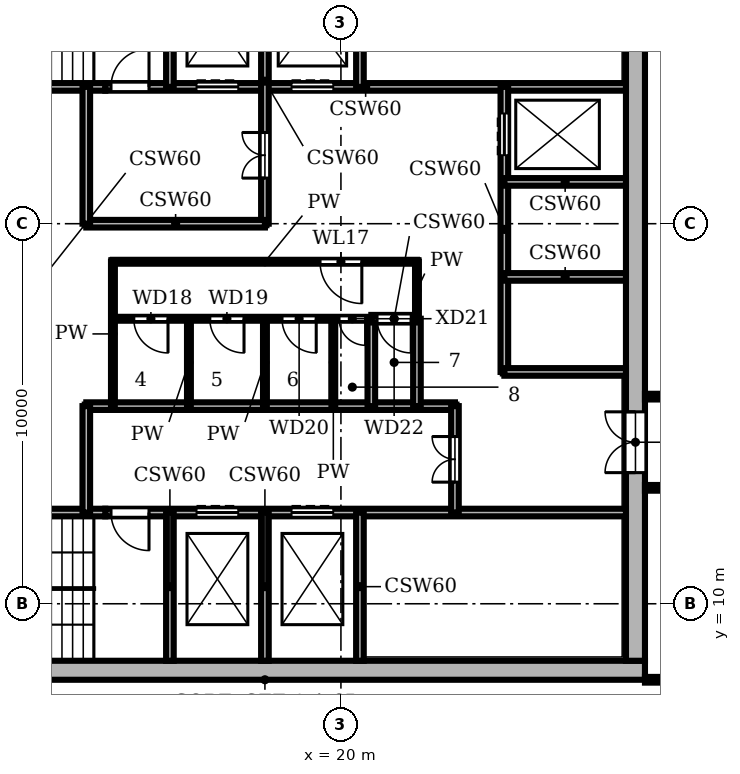
"""IFC4 building model, lengths in metres.
Left out: names, types, materials, properties, quantities, classifications, styles, units other than length and angle.
Written with IfcOpenShell. Run it as: python <this file> out.ifc"""

import sys

from ifc_helpers import new_model, si_unit, direction, frame, frame_2d, origin, place, context, subcontext, project, spatial, rectangle, extrude, element, fill, save


model = new_model("IFC4")
c1 = context("Model", 3, precision=1e-05, world=origin(), true_north=direction((0.0, 1.0)))
c2 = subcontext(c1, "Body", "Model", "MODEL_VIEW")
j1 = project(units=[si_unit("LENGTHUNIT", "METRE"), si_unit("PLANEANGLEUNIT", "RADIAN")], contexts=[c1])
p1 = place(None, origin())
s1 = spatial("IfcSite", under=j1, at=p1, CompositionType="ELEMENT")
p2 = place(p1, origin())
s2 = spatial("IfcBuilding", under=s1, at=p2, CompositionType="ELEMENT")
p3 = place(p2, frame((0.0, 0.0, 278.7)))
s3 = spatial("IfcBuildingStorey", under=s2, at=p3, CompositionType="ELEMENT", Elevation=278.7)
p4 = place(p3, frame((8.0, 8.25, 0.0), z_axis=(0.0, 0.0, 1.0), x_axis=(1.0, 0.0, 0.0)))
e1 = element("IfcWall", 1, at=p4, inside=s3, PredefinedType="SHEAR", context=c2, shape_type="SweptSolid", body=[
    extrude(rectangle(XDim=20.0, YDim=0.5, at=frame_2d((10.0, 0.0))), origin(), (0.0, 0.0, 1.0), 3.9),
])
p5 = place(p3, frame((27.75, 8.5, 0.0), z_axis=(0.0, 0.0, 1.0), x_axis=(0.0, 1.0, 0.0)))
e2 = element("IfcWall", 2, at=p5, inside=s3, PredefinedType="SHEAR", context=c2, shape_type="SweptSolid", body=[
    extrude(rectangle(XDim=19.0, YDim=0.5, at=frame_2d((9.5, 0.0))), origin(), (0.0, 0.0, 1.0), 3.9),
])
p6 = place(p5, frame((4.95, 0.0, 0.0)))
e3 = element("IfcOpeningElement", 3, at=p6, cuts=e2, PredefinedType="OPENING", context=c2, shape_type="SweptSolid", body=[
    extrude(rectangle(XDim=1.6, YDim=2.1, at=frame_2d((0.8, 1.05))), frame((0.0, 0.26, 0.0), z_axis=(0.0, -1.0, 0.0), x_axis=(1.0, 0.0, 0.0)), (0.0, 0.0, 1.0), 0.52),
])
p7 = place(p3, frame((8.5, 12.4, 0.0), z_axis=(0.0, 0.0, 1.0), x_axis=(1.0, 0.0, 0.0)))
e4 = element("IfcWall", 4, at=p7, inside=s3, PredefinedType="SHEAR", context=c2, shape_type="SweptSolid", body=[
    extrude(rectangle(XDim=5.3, YDim=0.2, at=frame_2d((2.65, 0.0))), origin(), (0.0, 0.0, 1.0), 3.58),
])
p8 = place(p3, frame((13.8, 12.4, 0.0), z_axis=(0.0, 0.0, 1.0), x_axis=(1.0, 0.0, 0.0)))
e5 = element("IfcWall", 5, at=p8, inside=s3, PredefinedType="SHEAR", context=c2, shape_type="SweptSolid", body=[
    extrude(rectangle(XDim=13.7, YDim=0.2, at=frame_2d((6.85, 0.0))), origin(), (0.0, 0.0, 1.0), 3.58),
])
p9 = place(p8, frame((2.4, 0.0, 0.0)))
e6 = element("IfcOpeningElement", 6, at=p9, cuts=e5, PredefinedType="OPENING", context=c2, shape_type="SweptSolid", body=[
    extrude(rectangle(XDim=1.1, YDim=2.1, at=frame_2d((0.55, 1.05))), frame((0.0, 0.11, 0.0), z_axis=(0.0, -1.0, 0.0), x_axis=(1.0, 0.0, 0.0)), (0.0, 0.0, 1.0), 0.22),
])
p10 = place(p8, frame((4.9, 0.0, 0.0)))
e7 = element("IfcOpeningElement", 7, at=p10, cuts=e5, PredefinedType="OPENING", context=c2, shape_type="SweptSolid", body=[
    extrude(rectangle(XDim=1.1, YDim=2.1, at=frame_2d((0.55, 1.05))), frame((0.0, 0.11, 0.0), z_axis=(0.0, -1.0, 0.0), x_axis=(1.0, 0.0, 0.0)), (0.0, 0.0, 1.0), 0.22),
])
p11 = place(p8, frame((0.15, 0.0, 0.0)))
e8 = element("IfcOpeningElement", 8, at=p11, cuts=e5, PredefinedType="OPENING", context=c2, shape_type="SweptSolid", body=[
    extrude(rectangle(XDim=1.0, YDim=2.1, at=frame_2d((0.5, 1.05))), frame((0.0, 0.11, 0.0), z_axis=(0.0, -1.0, 0.0), x_axis=(1.0, 0.0, 0.0)), (0.0, 0.0, 1.0), 0.22),
])
p12 = place(p3, frame((13.3, 15.2, 0.0), z_axis=(0.0, 0.0, 1.0), x_axis=(1.0, 0.0, 0.0)))
e9 = element("IfcWall", 9, at=p12, inside=s3, PredefinedType="SHEAR", context=c2, shape_type="SweptSolid", body=[
    extrude(rectangle(XDim=9.7, YDim=0.2, at=frame_2d((4.85, 0.0))), origin(), (0.0, 0.0, 1.0), 3.58),
])
p13 = place(p3, frame((24.3, 16.1, 0.0), z_axis=(0.0, 0.0, 1.0), x_axis=(1.0, 0.0, 0.0)))
e10 = element("IfcWall", 10, at=p13, inside=s3, PredefinedType="SHEAR", context=c2, shape_type="SweptSolid", body=[
    extrude(rectangle(XDim=3.2, YDim=0.2, at=frame_2d((1.6, 0.0))), origin(), (0.0, 0.0, 1.0), 3.58),
])
p14 = place(p3, frame((14.0, 17.5, 0.0), z_axis=(0.0, 0.0, 1.0), x_axis=(1.0, 0.0, 0.0)))
e11 = element("IfcWall", 11, at=p14, inside=s3, PredefinedType="PARTITIONING", context=c2, shape_type="SweptSolid", body=[
    extrude(rectangle(XDim=6.8, YDim=0.1, at=frame_2d((3.4, 0.0))), origin(), (0.0, 0.0, 1.0), 3.58),
])
p15 = place(p14, frame((0.55, 0.0, 0.0)))
e12 = element("IfcOpeningElement", 12, at=p15, cuts=e11, PredefinedType="OPENING", context=c2, shape_type="SweptSolid", body=[
    extrude(rectangle(XDim=0.9, YDim=2.1, at=frame_2d((0.45, 1.05))), frame((0.0, 0.06, 0.0), z_axis=(0.0, -1.0, 0.0), x_axis=(1.0, 0.0, 0.0)), (0.0, 0.0, 1.0), 0.12),
])
p16 = place(p14, frame((2.55, 0.0, 0.0)))
e13 = element("IfcOpeningElement", 13, at=p16, cuts=e11, PredefinedType="OPENING", context=c2, shape_type="SweptSolid", body=[
    extrude(rectangle(XDim=0.9, YDim=2.1, at=frame_2d((0.45, 1.05))), frame((0.0, 0.06, 0.0), z_axis=(0.0, -1.0, 0.0), x_axis=(1.0, 0.0, 0.0)), (0.0, 0.0, 1.0), 0.12),
])
p17 = place(p14, frame((4.45, 0.0, 0.0)))
e14 = element("IfcOpeningElement", 14, at=p17, cuts=e11, PredefinedType="OPENING", context=c2, shape_type="SweptSolid", body=[
    extrude(rectangle(XDim=0.9, YDim=2.1, at=frame_2d((0.45, 1.05))), frame((0.0, 0.06, 0.0), z_axis=(0.0, -1.0, 0.0), x_axis=(1.0, 0.0, 0.0)), (0.0, 0.0, 1.0), 0.12),
])
p18 = place(p14, frame((5.95, 0.0, 0.0)))
e15 = element("IfcOpeningElement", 15, at=p18, cuts=e11, PredefinedType="OPENING", context=c2, shape_type="SweptSolid", body=[
    extrude(rectangle(XDim=0.7, YDim=2.1, at=frame_2d((0.35, 1.05))), frame((0.0, 0.06, 0.0), z_axis=(0.0, -1.0, 0.0), x_axis=(1.0, 0.0, 0.0)), (0.0, 0.0, 1.0), 0.12),
])
p19 = place(p3, frame((20.8, 17.5, 0.0), z_axis=(0.0, 0.0, 1.0), x_axis=(1.0, 0.0, 0.0)))
e16 = element("IfcWall", 16, at=p19, inside=s3, PredefinedType="SHEAR", context=c2, shape_type="SweptSolid", body=[
    extrude(rectangle(XDim=1.2, YDim=0.2, at=frame_2d((0.6, 0.0))), origin(), (0.0, 0.0, 1.0), 3.58),
])
p20 = place(p19, frame((0.15, 0.0, 0.0)))
e17 = element("IfcOpeningElement", 17, at=p20, cuts=e16, PredefinedType="OPENING", context=c2, shape_type="SweptSolid", body=[
    extrude(rectangle(XDim=0.9, YDim=2.1, at=frame_2d((0.45, 1.05))), frame((0.0, 0.11, 0.0), z_axis=(0.0, -1.0, 0.0), x_axis=(1.0, 0.0, 0.0)), (0.0, 0.0, 1.0), 0.22),
])
p21 = place(p3, frame((24.3, 18.6, 0.0), z_axis=(0.0, 0.0, 1.0), x_axis=(1.0, 0.0, 0.0)))
e18 = element("IfcWall", 18, at=p21, inside=s3, PredefinedType="SHEAR", context=c2, shape_type="SweptSolid", body=[
    extrude(rectangle(XDim=3.2, YDim=0.2, at=frame_2d((1.6, 0.0))), origin(), (0.0, 0.0, 1.0), 3.58),
])
p22 = place(p3, frame((14.0, 19.0, 0.0), z_axis=(0.0, 0.0, 1.0), x_axis=(1.0, 0.0, 0.0)))
e19 = element("IfcWall", 19, at=p22, inside=s3, PredefinedType="PARTITIONING", context=c2, shape_type="SweptSolid", body=[
    extrude(rectangle(XDim=8.0, YDim=0.1, at=frame_2d((4.0, 0.0))), origin(), (0.0, 0.0, 1.0), 3.58),
])
p23 = place(p22, frame((5.45, 0.0, 0.0)))
e20 = element("IfcOpeningElement", 20, at=p23, cuts=e19, PredefinedType="OPENING", context=c2, shape_type="SweptSolid", body=[
    extrude(rectangle(XDim=1.1, YDim=2.1, at=frame_2d((0.55, 1.05))), frame((0.0, 0.06, 0.0), z_axis=(0.0, -1.0, 0.0), x_axis=(1.0, 0.0, 0.0)), (0.0, 0.0, 1.0), 0.12),
])
p24 = place(p3, frame((13.3, 20.0, 0.0), z_axis=(0.0, 0.0, 1.0), x_axis=(1.0, 0.0, 0.0)))
e21 = element("IfcWall", 21, at=p24, inside=s3, PredefinedType="SHEAR", context=c2, shape_type="SweptSolid", body=[
    extrude(rectangle(XDim=4.7, YDim=0.2, at=frame_2d((2.35, 0.0))), origin(), (0.0, 0.0, 1.0), 3.58),
])
p25 = place(p3, frame((24.3, 21.1, 0.0), z_axis=(0.0, 0.0, 1.0), x_axis=(1.0, 0.0, 0.0)))
e22 = element("IfcWall", 22, at=p25, inside=s3, PredefinedType="SHEAR", context=c2, shape_type="SweptSolid", body=[
    extrude(rectangle(XDim=3.2, YDim=0.2, at=frame_2d((1.6, 0.0))), origin(), (0.0, 0.0, 1.0), 3.58),
])
p26 = place(p3, frame((8.5, 23.6, 0.0), z_axis=(0.0, 0.0, 1.0), x_axis=(1.0, 0.0, 0.0)))
e23 = element("IfcWall", 23, at=p26, inside=s3, PredefinedType="SHEAR", context=c2, shape_type="SweptSolid", body=[
    extrude(rectangle(XDim=5.3, YDim=0.2, at=frame_2d((2.65, 0.0))), origin(), (0.0, 0.0, 1.0), 3.58),
])
p27 = place(p3, frame((13.8, 23.6, 0.0), z_axis=(0.0, 0.0, 1.0), x_axis=(1.0, 0.0, 0.0)))
e24 = element("IfcWall", 24, at=p27, inside=s3, PredefinedType="SHEAR", context=c2, shape_type="SweptSolid", body=[
    extrude(rectangle(XDim=13.7, YDim=0.2, at=frame_2d((6.85, 0.0))), origin(), (0.0, 0.0, 1.0), 3.58),
])
p28 = place(p27, frame((2.4, 0.0, 0.0)))
e25 = element("IfcOpeningElement", 25, at=p28, cuts=e24, PredefinedType="OPENING", context=c2, shape_type="SweptSolid", body=[
    extrude(rectangle(XDim=1.1, YDim=2.1, at=frame_2d((0.55, 1.05))), frame((0.0, 0.11, 0.0), z_axis=(0.0, -1.0, 0.0), x_axis=(1.0, 0.0, 0.0)), (0.0, 0.0, 1.0), 0.22),
])
p29 = place(p27, frame((4.9, 0.0, 0.0)))
e26 = element("IfcOpeningElement", 26, at=p29, cuts=e24, PredefinedType="OPENING", context=c2, shape_type="SweptSolid", body=[
    extrude(rectangle(XDim=1.1, YDim=2.1, at=frame_2d((0.55, 1.05))), frame((0.0, 0.11, 0.0), z_axis=(0.0, -1.0, 0.0), x_axis=(1.0, 0.0, 0.0)), (0.0, 0.0, 1.0), 0.22),
])
p30 = place(p27, frame((0.15, 0.0, 0.0)))
e27 = element("IfcOpeningElement", 27, at=p30, cuts=e24, PredefinedType="OPENING", context=c2, shape_type="SweptSolid", body=[
    extrude(rectangle(XDim=1.0, YDim=2.1, at=frame_2d((0.5, 1.05))), frame((0.0, 0.11, 0.0), z_axis=(0.0, -1.0, 0.0), x_axis=(1.0, 0.0, 0.0)), (0.0, 0.0, 1.0), 0.22),
])
p31 = place(p3, frame((13.3, 12.4, 0.0), z_axis=(0.0, 0.0, 1.0), x_axis=(0.0, 1.0, 0.0)))
e28 = element("IfcWall", 28, at=p31, inside=s3, PredefinedType="SHEAR", context=c2, shape_type="SweptSolid", body=[
    extrude(rectangle(XDim=2.8, YDim=0.2, at=frame_2d((1.4, 0.0))), origin(), (0.0, 0.0, 1.0), 3.58),
])
p32 = place(p3, frame((13.3, 20.0, 0.0), z_axis=(0.0, 0.0, 1.0), x_axis=(0.0, 1.0, 0.0)))
e29 = element("IfcWall", 29, at=p32, inside=s3, PredefinedType="SHEAR", context=c2, shape_type="SweptSolid", body=[
    extrude(rectangle(XDim=3.6, YDim=0.2, at=frame_2d((1.8, 0.0))), origin(), (0.0, 0.0, 1.0), 3.58),
])
p33 = place(p3, frame((14.0, 15.2, 0.0), z_axis=(0.0, 0.0, 1.0), x_axis=(0.0, 1.0, 0.0)))
e30 = element("IfcWall", 30, at=p33, inside=s3, PredefinedType="PARTITIONING", context=c2, shape_type="SweptSolid", body=[
    extrude(rectangle(XDim=3.8, YDim=0.1, at=frame_2d((1.9, 0.0))), origin(), (0.0, 0.0, 1.0), 3.58),
])
for number, where, z_axis, x_axis in (
    (31, (15.5, 8.5, 0.0), (0.0, 0.0, 1.0), (0.0, 1.0, 0.0)),
    (32, (15.5, 23.6, 0.0), (0.0, 0.0, 1.0), (0.0, 1.0, 0.0)),
):
    element("IfcWall", number, at=place(p3, frame(where, z_axis=z_axis, x_axis=x_axis)), inside=s3, PredefinedType="SHEAR", context=c2, shape_type="SweptSolid", body=[
        extrude(rectangle(XDim=3.9, YDim=0.2, at=frame_2d((1.95, 0.0))), origin(), (0.0, 0.0, 1.0), 3.58),
    ])
for number, where, z_axis, x_axis in (
    (33, (16.0, 15.2, 0.0), (0.0, 0.0, 1.0), (0.0, 1.0, 0.0)),
    (34, (18.0, 15.2, 0.0), (0.0, 0.0, 1.0), (0.0, 1.0, 0.0)),
):
    element("IfcWall", number, at=place(p3, frame(where, z_axis=z_axis, x_axis=x_axis)), inside=s3, PredefinedType="PARTITIONING", context=c2, shape_type="SweptSolid", body=[
        extrude(rectangle(XDim=2.3, YDim=0.1, at=frame_2d((1.15, 0.0))), origin(), (0.0, 0.0, 1.0), 3.58),
    ])
p34 = place(p3, frame((18.0, 8.5, 0.0), z_axis=(0.0, 0.0, 1.0), x_axis=(0.0, 1.0, 0.0)))
e35 = element("IfcWall", 35, at=p34, inside=s3, PredefinedType="SHEAR", context=c2, shape_type="SweptSolid", body=[
    extrude(rectangle(XDim=3.9, YDim=0.2, at=frame_2d((1.95, 0.0))), origin(), (0.0, 0.0, 1.0), 3.58),
])
p35 = place(p3, frame((18.0, 20.0, 0.0), z_axis=(0.0, 0.0, 1.0), x_axis=(0.0, 1.0, 0.0)))
e36 = element("IfcWall", 36, at=p35, inside=s3, PredefinedType="SHEAR", context=c2, shape_type="SweptSolid", body=[
    extrude(rectangle(XDim=7.5, YDim=0.2, at=frame_2d((3.75, 0.0))), origin(), (0.0, 0.0, 1.0), 3.58),
])
p36 = place(p35, frame((1.2, 0.0, 0.0)))
e37 = element("IfcOpeningElement", 37, at=p36, cuts=e36, PredefinedType="OPENING", context=c2, shape_type="SweptSolid", body=[
    extrude(rectangle(XDim=1.2, YDim=2.1, at=frame_2d((0.6, 1.05))), frame((0.0, 0.11, 0.0), z_axis=(0.0, -1.0, 0.0), x_axis=(1.0, 0.0, 0.0)), (0.0, 0.0, 1.0), 0.22),
])
p37 = place(p3, frame((19.8, 15.2, 0.0), z_axis=(0.0, 0.0, 1.0), x_axis=(0.0, 1.0, 0.0)))
e38 = element("IfcWall", 38, at=p37, inside=s3, PredefinedType="PARTITIONING", context=c2, shape_type="SweptSolid", body=[
    extrude(rectangle(XDim=2.3, YDim=0.1, at=frame_2d((1.15, 0.0))), origin(), (0.0, 0.0, 1.0), 3.58),
])
for number, where, z_axis, x_axis in (
    (39, (20.5, 8.5, 0.0), (0.0, 0.0, 1.0), (0.0, 1.0, 0.0)),
    (40, (20.5, 23.6, 0.0), (0.0, 0.0, 1.0), (0.0, 1.0, 0.0)),
):
    element("IfcWall", number, at=place(p3, frame(where, z_axis=z_axis, x_axis=x_axis)), inside=s3, PredefinedType="SHEAR", context=c2, shape_type="SweptSolid", body=[
        extrude(rectangle(XDim=3.9, YDim=0.2, at=frame_2d((1.95, 0.0))), origin(), (0.0, 0.0, 1.0), 3.58),
    ])
p38 = place(p3, frame((20.8, 15.2, 0.0), z_axis=(0.0, 0.0, 1.0), x_axis=(0.0, 1.0, 0.0)))
e41 = element("IfcWall", 41, at=p38, inside=s3, PredefinedType="SHEAR", context=c2, shape_type="SweptSolid", body=[
    extrude(rectangle(XDim=2.3, YDim=0.2, at=frame_2d((1.15, 0.0))), origin(), (0.0, 0.0, 1.0), 3.58),
])
p39 = place(p3, frame((22.0, 17.5, 0.0), z_axis=(0.0, 0.0, 1.0), x_axis=(0.0, 1.0, 0.0)))
e42 = element("IfcWall", 42, at=p39, inside=s3, PredefinedType="PARTITIONING", context=c2, shape_type="SweptSolid", body=[
    extrude(rectangle(XDim=1.5, YDim=0.1, at=frame_2d((0.75, 0.0))), origin(), (0.0, 0.0, 1.0), 3.58),
])
p40 = place(p3, frame((22.0, 15.2, 0.0), z_axis=(0.0, 0.0, 1.0), x_axis=(0.0, 1.0, 0.0)))
e43 = element("IfcWall", 43, at=p40, inside=s3, PredefinedType="SHEAR", context=c2, shape_type="SweptSolid", body=[
    extrude(rectangle(XDim=2.3, YDim=0.2, at=frame_2d((1.15, 0.0))), origin(), (0.0, 0.0, 1.0), 3.58),
])
p41 = place(p3, frame((23.0, 12.4, 0.0), z_axis=(0.0, 0.0, 1.0), x_axis=(0.0, 1.0, 0.0)))
e44 = element("IfcWall", 44, at=p41, inside=s3, PredefinedType="SHEAR", context=c2, shape_type="SweptSolid", body=[
    extrude(rectangle(XDim=2.8, YDim=0.2, at=frame_2d((1.4, 0.0))), origin(), (0.0, 0.0, 1.0), 3.58),
])
p42 = place(p41, frame((0.8, 0.0, 0.0)))
e45 = element("IfcOpeningElement", 45, at=p42, cuts=e44, PredefinedType="OPENING", context=c2, shape_type="SweptSolid", body=[
    extrude(rectangle(XDim=1.2, YDim=2.1, at=frame_2d((0.6, 1.05))), frame((0.0, 0.11, 0.0), z_axis=(0.0, -1.0, 0.0), x_axis=(1.0, 0.0, 0.0)), (0.0, 0.0, 1.0), 0.22),
])
p43 = place(p3, frame((24.3, 16.1, 0.0), z_axis=(0.0, 0.0, 1.0), x_axis=(0.0, 1.0, 0.0)))
e46 = element("IfcWall", 46, at=p43, inside=s3, PredefinedType="SHEAR", context=c2, shape_type="SweptSolid", body=[
    extrude(rectangle(XDim=7.5, YDim=0.2, at=frame_2d((3.75, 0.0))), origin(), (0.0, 0.0, 1.0), 3.58),
])
p44 = place(p43, frame((5.7, 0.0, 0.0)))
e47 = element("IfcOpeningElement", 47, at=p44, cuts=e46, PredefinedType="OPENING", context=c2, shape_type="SweptSolid", body=[
    extrude(rectangle(XDim=1.1, YDim=2.1, at=frame_2d((0.55, 1.05))), frame((0.0, 0.11, 0.0), z_axis=(0.0, -1.0, 0.0), x_axis=(1.0, 0.0, 0.0)), (0.0, 0.0, 1.0), 0.22),
])
for number, where, z_axis, x_axis in (
    (48, (28.0, 8.0, 0.0), (0.0, 0.0, 1.0), (1.0, 0.0, 0.0)),
    (49, (28.0, 13.05, 0.0), (0.0, 0.0, 1.0), (1.0, 0.0, 0.0)),
    (50, (28.0, 15.45, 0.0), (0.0, 0.0, 1.0), (1.0, 0.0, 0.0)),
):
    element("IfcWall", number, at=place(p3, frame(where, z_axis=z_axis, x_axis=x_axis)), inside=s3, PredefinedType="PARTITIONING", context=c2, shape_type="SweptSolid", body=[
        extrude(rectangle(XDim=2.8, YDim=0.15, at=frame_2d((1.4, 0.0))), origin(), (0.0, 0.0, 1.0), 3.58),
    ])
p45 = place(p44, origin())
e51 = element("IfcDoor", 51, at=p45, inside=s3, OperationType="DOUBLE_DOOR_SLIDING", PredefinedType="DOOR", context=c2, shape_type="SweptSolid", body=[
    extrude(rectangle(XDim=1.1, YDim=2.1, at=frame_2d((0.55, 1.05))), frame((0.0, 0.025, 0.0), z_axis=(0.0, -1.0, 0.0), x_axis=(1.0, 0.0, 0.0)), (0.0, 0.0, 1.0), 0.05),
])
fill(e47, e51)
p46 = place(p9, origin())
e52 = element("IfcDoor", 52, at=p46, inside=s3, OperationType="DOUBLE_DOOR_SLIDING", PredefinedType="DOOR", context=c2, shape_type="SweptSolid", body=[
    extrude(rectangle(XDim=1.1, YDim=2.1, at=frame_2d((0.55, 1.05))), frame((0.0, 0.025, 0.0), z_axis=(0.0, -1.0, 0.0), x_axis=(1.0, 0.0, 0.0)), (0.0, 0.0, 1.0), 0.05),
])
fill(e6, e52)
p47 = place(p10, origin())
e53 = element("IfcDoor", 53, at=p47, inside=s3, OperationType="DOUBLE_DOOR_SLIDING", PredefinedType="DOOR", context=c2, shape_type="SweptSolid", body=[
    extrude(rectangle(XDim=1.1, YDim=2.1, at=frame_2d((0.55, 1.05))), frame((0.0, 0.025, 0.0), z_axis=(0.0, -1.0, 0.0), x_axis=(1.0, 0.0, 0.0)), (0.0, 0.0, 1.0), 0.05),
])
fill(e7, e53)
p48 = place(p28, origin())
e54 = element("IfcDoor", 54, at=p48, inside=s3, OperationType="DOUBLE_DOOR_SLIDING", PredefinedType="DOOR", context=c2, shape_type="SweptSolid", body=[
    extrude(rectangle(XDim=1.1, YDim=2.1, at=frame_2d((0.55, 1.05))), frame((0.0, 0.025, 0.0), z_axis=(0.0, -1.0, 0.0), x_axis=(1.0, 0.0, 0.0)), (0.0, 0.0, 1.0), 0.05),
])
fill(e25, e54)
p49 = place(p29, origin())
e55 = element("IfcDoor", 55, at=p49, inside=s3, OperationType="DOUBLE_DOOR_SLIDING", PredefinedType="DOOR", context=c2, shape_type="SweptSolid", body=[
    extrude(rectangle(XDim=1.1, YDim=2.1, at=frame_2d((0.55, 1.05))), frame((0.0, 0.025, 0.0), z_axis=(0.0, -1.0, 0.0), x_axis=(1.0, 0.0, 0.0)), (0.0, 0.0, 1.0), 0.05),
])
fill(e26, e55)
p50 = place(p11, frame((1.0, 0.0, 0.0), z_axis=(0.0, 0.0, 1.0), x_axis=(-1.0, 0.0, 0.0)))
e56 = element("IfcDoor", 56, at=p50, inside=s3, OperationType="SINGLE_SWING_LEFT", PredefinedType="DOOR", context=c2, shape_type="SweptSolid", body=[
    extrude(rectangle(XDim=1.0, YDim=2.1, at=frame_2d((0.5, 1.05))), frame((0.0, 0.025, 0.0), z_axis=(0.0, -1.0, 0.0), x_axis=(1.0, 0.0, 0.0)), (0.0, 0.0, 1.0), 0.05),
])
fill(e8, e56)
p51 = place(p30, origin())
e57 = element("IfcDoor", 57, at=p51, inside=s3, OperationType="SINGLE_SWING_RIGHT", PredefinedType="DOOR", context=c2, shape_type="SweptSolid", body=[
    extrude(rectangle(XDim=1.0, YDim=2.1, at=frame_2d((0.5, 1.05))), frame((0.0, 0.025, 0.0), z_axis=(0.0, -1.0, 0.0), x_axis=(1.0, 0.0, 0.0)), (0.0, 0.0, 1.0), 0.05),
])
fill(e27, e57)
p52 = place(p42, origin())
e58 = element("IfcDoor", 58, at=p52, inside=s3, OperationType="DOUBLE_DOOR_SINGLE_SWING", PredefinedType="DOOR", context=c2, shape_type="SweptSolid", body=[
    extrude(rectangle(XDim=1.2, YDim=2.1, at=frame_2d((0.6, 1.05))), frame((0.0, 0.025, 0.0), z_axis=(0.0, -1.0, 0.0), x_axis=(1.0, 0.0, 0.0)), (0.0, 0.0, 1.0), 0.05),
])
fill(e45, e58)
p53 = place(p36, origin())
e59 = element("IfcDoor", 59, at=p53, inside=s3, OperationType="DOUBLE_DOOR_SINGLE_SWING", PredefinedType="DOOR", context=c2, shape_type="SweptSolid", body=[
    extrude(rectangle(XDim=1.2, YDim=2.1, at=frame_2d((0.6, 1.05))), frame((0.0, 0.025, 0.0), z_axis=(0.0, -1.0, 0.0), x_axis=(1.0, 0.0, 0.0)), (0.0, 0.0, 1.0), 0.05),
])
fill(e37, e59)
p54 = place(p23, frame((1.1, 0.0, 0.0), z_axis=(0.0, 0.0, 1.0), x_axis=(-1.0, 0.0, 0.0)))
e60 = element("IfcDoor", 60, at=p54, inside=s3, OperationType="SINGLE_SWING_LEFT", PredefinedType="DOOR", context=c2, shape_type="SweptSolid", body=[
    extrude(rectangle(XDim=1.1, YDim=2.1, at=frame_2d((0.55, 1.05))), frame((0.0, 0.025, 0.0), z_axis=(0.0, -1.0, 0.0), x_axis=(1.0, 0.0, 0.0)), (0.0, 0.0, 1.0), 0.05),
])
fill(e20, e60)
p55 = place(p15, frame((0.9, 0.0, 0.0), z_axis=(0.0, 0.0, 1.0), x_axis=(-1.0, 0.0, 0.0)))
e61 = element("IfcDoor", 61, at=p55, inside=s3, OperationType="SINGLE_SWING_LEFT", PredefinedType="DOOR", context=c2, shape_type="SweptSolid", body=[
    extrude(rectangle(XDim=0.9, YDim=2.1, at=frame_2d((0.45, 1.05))), frame((0.0, 0.025, 0.0), z_axis=(0.0, -1.0, 0.0), x_axis=(1.0, 0.0, 0.0)), (0.0, 0.0, 1.0), 0.05),
])
fill(e12, e61)
p56 = place(p16, frame((0.9, 0.0, 0.0), z_axis=(0.0, 0.0, 1.0), x_axis=(-1.0, 0.0, 0.0)))
e62 = element("IfcDoor", 62, at=p56, inside=s3, OperationType="SINGLE_SWING_LEFT", PredefinedType="DOOR", context=c2, shape_type="SweptSolid", body=[
    extrude(rectangle(XDim=0.9, YDim=2.1, at=frame_2d((0.45, 1.05))), frame((0.0, 0.025, 0.0), z_axis=(0.0, -1.0, 0.0), x_axis=(1.0, 0.0, 0.0)), (0.0, 0.0, 1.0), 0.05),
])
fill(e13, e62)
p57 = place(p17, frame((0.9, 0.0, 0.0), z_axis=(0.0, 0.0, 1.0), x_axis=(-1.0, 0.0, 0.0)))
e63 = element("IfcDoor", 63, at=p57, inside=s3, OperationType="SINGLE_SWING_LEFT", PredefinedType="DOOR", context=c2, shape_type="SweptSolid", body=[
    extrude(rectangle(XDim=0.9, YDim=2.1, at=frame_2d((0.45, 1.05))), frame((0.0, 0.025, 0.0), z_axis=(0.0, -1.0, 0.0), x_axis=(1.0, 0.0, 0.0)), (0.0, 0.0, 1.0), 0.05),
])
fill(e14, e63)
p58 = place(p18, frame((0.7, 0.0, 0.0), z_axis=(0.0, 0.0, 1.0), x_axis=(-1.0, 0.0, 0.0)))
e64 = element("IfcDoor", 64, at=p58, inside=s3, OperationType="SINGLE_SWING_LEFT", PredefinedType="DOOR", context=c2, shape_type="SweptSolid", body=[
    extrude(rectangle(XDim=0.7, YDim=2.1, at=frame_2d((0.35, 1.05))), frame((0.0, 0.025, 0.0), z_axis=(0.0, -1.0, 0.0), x_axis=(1.0, 0.0, 0.0)), (0.0, 0.0, 1.0), 0.05),
])
fill(e15, e64)
p59 = place(p20, frame((0.9, 0.0, 0.0), z_axis=(0.0, 0.0, 1.0), x_axis=(-1.0, 0.0, 0.0)))
e65 = element("IfcDoor", 65, at=p59, inside=s3, OperationType="SINGLE_SWING_LEFT", PredefinedType="DOOR", context=c2, shape_type="SweptSolid", body=[
    extrude(rectangle(XDim=0.9, YDim=2.1, at=frame_2d((0.45, 1.05))), frame((0.0, 0.025, 0.0), z_axis=(0.0, -1.0, 0.0), x_axis=(1.0, 0.0, 0.0)), (0.0, 0.0, 1.0), 0.05),
])
fill(e17, e65)
p60 = place(p6, origin())
e66 = element("IfcDoor", 66, at=p60, inside=s3, OperationType="DOUBLE_DOOR_SINGLE_SWING", PredefinedType="DOOR", context=c2, shape_type="SweptSolid", body=[
    extrude(rectangle(XDim=1.6, YDim=2.1, at=frame_2d((0.8, 1.05))), frame((0.0, 0.025, 0.0), z_axis=(0.0, -1.0, 0.0), x_axis=(1.0, 0.0, 0.0)), (0.0, 0.0, 1.0), 0.05),
])
fill(e3, e66)
save(model, sys.argv[1])
